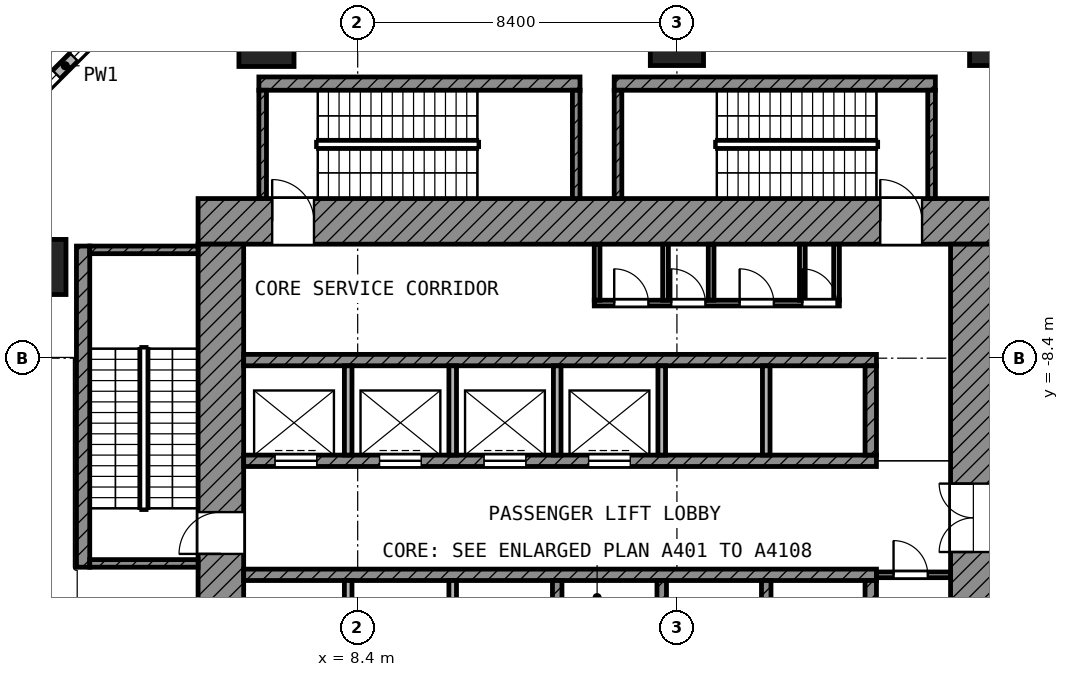
"""IFC4 building model, lengths in metres.
Left out: names, types, materials, properties, quantities, classifications, styles, units other than length and angle.
Written with IfcOpenShell. Run it as: python <this file> out.ifc"""

import sys

from ifc_helpers import new_model, si_unit, direction, frame, frame_2d, origin, origin_2d, place, context, subcontext, project, spatial, rectangle, extrude, element, fill, save


model = new_model("IFC4")
c1 = context("Model", 3, precision=1e-05, world=origin(), true_north=direction((0.0, 1.0)))
c2 = subcontext(c1, "Body", "Model", "MODEL_VIEW")
j1 = project(units=[si_unit("LENGTHUNIT", "METRE"), si_unit("PLANEANGLEUNIT", "RADIAN")], contexts=[c1])
p1 = place(None, origin())
s1 = spatial("IfcSite", under=j1, at=p1, CompositionType="ELEMENT")
p2 = place(p1, origin())
s2 = spatial("IfcBuilding", under=s1, at=p2, CompositionType="ELEMENT")
p3 = place(p2, frame((0.0, 0.0, 18.2)))
s3 = spatial("IfcBuildingStorey", under=s2, at=p3, CompositionType="ELEMENT", Elevation=18.2)
p4 = place(p3, frame((6.0, 0.0, 0.0), z_axis=(0.0, 0.0, 1.0), x_axis=(1.0, 0.0, 0.0)))
e1 = element("IfcColumn", 1, at=p4, inside=s3, PredefinedType="COLUMN", context=c2, shape_type="SweptSolid", body=[
    extrude(rectangle(XDim=1.45, YDim=1.45, at=origin_2d()), origin(), (0.0, 0.0, 1.0), 5.6),
])
for number, where, z_axis, x_axis in (
    (2, (16.8, 0.0, 0.0), (0.0, 0.0, 1.0), (1.0, 0.0, 0.0)),
    (3, (25.2, 0.0, 0.0), (0.0, 0.0, 1.0), (1.0, 0.0, 0.0)),
):
    element("IfcColumn", number, at=place(p3, frame(where, z_axis=z_axis, x_axis=x_axis)), inside=s3, PredefinedType="COLUMN", context=c2, shape_type="SweptSolid", body=[
        extrude(rectangle(XDim=1.4, YDim=1.4, at=origin_2d()), origin(), (0.0, 0.0, 1.0), 5.6),
    ])
p5 = place(p3, frame((0.0, -6.0, 0.0), z_axis=(0.0, 0.0, 1.0), x_axis=(1.0, 0.0, 0.0)))
e4 = element("IfcColumn", 4, at=p5, inside=s3, PredefinedType="COLUMN", context=c2, shape_type="SweptSolid", body=[
    extrude(rectangle(XDim=1.45, YDim=1.45, at=origin_2d()), origin(), (0.0, 0.0, 1.0), 5.6),
])
p6 = place(p3, frame((3.662, 2.25, 0.0), z_axis=(0.0, 0.0, 1.0), x_axis=(-0.707106781187, -0.707106781187, 0.0)))
e5 = element("IfcWall", 5, at=p6, inside=s3, PredefinedType="SOLIDWALL", context=c2, shape_type="SweptSolid", body=[
    extrude(rectangle(XDim=8.361, YDim=0.3, at=frame_2d((4.181, 0.0))), origin(), (0.0, 0.0, 1.0), 5.05),
])
p7 = place(p6, frame((0.259, 0.0, 0.9)))
e6 = element("IfcOpeningElement", 6, at=p7, cuts=e5, PredefinedType="OPENING", context=c2, shape_type="SweptSolid", body=[
    extrude(rectangle(XDim=3.6, YDim=3.0, at=frame_2d((1.8, 1.5))), frame((0.0, 0.16, 0.0), z_axis=(0.0, -1.0, 0.0), x_axis=(1.0, 0.0, 0.0)), (0.0, 0.0, 1.0), 0.32),
])
p8 = place(p6, frame((4.502, 0.0, 0.9)))
e7 = element("IfcOpeningElement", 7, at=p8, cuts=e5, PredefinedType="OPENING", context=c2, shape_type="SweptSolid", body=[
    extrude(rectangle(XDim=3.6, YDim=3.0, at=frame_2d((1.8, 1.5))), frame((0.0, 0.16, 0.0), z_axis=(0.0, -1.0, 0.0), x_axis=(1.0, 0.0, 0.0)), (0.0, 0.0, 1.0), 0.32),
])
p9 = place(p3, frame((4.2, -4.8, 0.0), z_axis=(0.0, 0.0, 1.0), x_axis=(1.0, 0.0, 0.0)))
e8 = element("IfcWall", 8, at=p9, inside=s3, PredefinedType="SHEAR", context=c2, shape_type="SweptSolid", body=[
    extrude(rectangle(XDim=21.0, YDim=1.2, at=frame_2d((10.5, 0.0))), origin(), (0.0, 0.0, 1.0), 5.05),
])
p10 = place(p9, frame((1.95, 0.0, 0.0)))
e9 = element("IfcOpeningElement", 9, at=p10, cuts=e8, PredefinedType="OPENING", context=c2, shape_type="SweptSolid", body=[
    extrude(rectangle(XDim=1.1, YDim=2.1, at=frame_2d((0.55, 1.05))), frame((0.0, 0.61, 0.0), z_axis=(0.0, -1.0, 0.0), x_axis=(1.0, 0.0, 0.0)), (0.0, 0.0, 1.0), 1.22),
])
p11 = place(p9, frame((17.95, 0.0, 0.0)))
e10 = element("IfcOpeningElement", 10, at=p11, cuts=e8, PredefinedType="OPENING", context=c2, shape_type="SweptSolid", body=[
    extrude(rectangle(XDim=1.1, YDim=2.1, at=frame_2d((0.55, 1.05))), frame((0.0, 0.61, 0.0), z_axis=(0.0, -1.0, 0.0), x_axis=(1.0, 0.0, 0.0)), (0.0, 0.0, 1.0), 1.22),
])
p12 = place(p3, frame((4.8, -25.2, 0.0), z_axis=(0.0, 0.0, 1.0), x_axis=(0.0, 1.0, 0.0)))
e11 = element("IfcWall", 11, at=p12, inside=s3, PredefinedType="SHEAR", context=c2, shape_type="SweptSolid", body=[
    extrude(rectangle(XDim=19.8, YDim=1.2, at=frame_2d((9.9, 0.0))), origin(), (0.0, 0.0, 1.0), 5.05),
])
p13 = place(p12, frame((11.65, 0.0, 0.0)))
e12 = element("IfcOpeningElement", 12, at=p13, cuts=e11, PredefinedType="OPENING", context=c2, shape_type="SweptSolid", body=[
    extrude(rectangle(XDim=1.1, YDim=2.1, at=frame_2d((0.55, 1.05))), frame((0.0, 0.61, 0.0), z_axis=(0.0, -1.0, 0.0), x_axis=(1.0, 0.0, 0.0)), (0.0, 0.0, 1.0), 1.22),
])
p14 = place(p12, frame((2.35, 0.0, 0.0)))
e13 = element("IfcOpeningElement", 13, at=p14, cuts=e11, PredefinedType="OPENING", context=c2, shape_type="SweptSolid", body=[
    extrude(rectangle(XDim=1.1, YDim=2.1, at=frame_2d((0.55, 1.05))), frame((0.0, 0.61, 0.0), z_axis=(0.0, -1.0, 0.0), x_axis=(1.0, 0.0, 0.0)), (0.0, 0.0, 1.0), 1.22),
])
p15 = place(p3, frame((24.6, -24.0, 0.0), z_axis=(0.0, 0.0, 1.0), x_axis=(0.0, 1.0, 0.0)))
e14 = element("IfcWall", 14, at=p15, inside=s3, PredefinedType="SHEAR", context=c2, shape_type="SweptSolid", body=[
    extrude(rectangle(XDim=18.6, YDim=1.2, at=frame_2d((9.3, 0.0))), origin(), (0.0, 0.0, 1.0), 5.05),
])
p16 = place(p15, frame((10.5, 0.0, 0.0)))
e15 = element("IfcOpeningElement", 15, at=p16, cuts=e14, PredefinedType="OPENING", context=c2, shape_type="SweptSolid", body=[
    extrude(rectangle(XDim=1.8, YDim=2.1, at=frame_2d((0.9, 1.05))), frame((0.0, 0.61, 0.0), z_axis=(0.0, -1.0, 0.0), x_axis=(1.0, 0.0, 0.0)), (0.0, 0.0, 1.0), 1.22),
])
p17 = place(p3, frame((5.4, -8.45, 0.0), z_axis=(0.0, 0.0, 1.0), x_axis=(1.0, 0.0, 0.0)))
e16 = element("IfcWall", 16, at=p17, inside=s3, PredefinedType="SHEAR", context=c2, shape_type="SweptSolid", body=[
    extrude(rectangle(XDim=16.65, YDim=0.3, at=frame_2d((8.325, 0.0))), origin(), (0.0, 0.0, 1.0), 5.05),
])
p18 = place(p3, frame((5.4, -11.1, 0.0), z_axis=(0.0, 0.0, 1.0), x_axis=(1.0, 0.0, 0.0)))
e17 = element("IfcWall", 17, at=p18, inside=s3, PredefinedType="SHEAR", context=c2, shape_type="SweptSolid", body=[
    extrude(rectangle(XDim=16.65, YDim=0.3, at=frame_2d((8.325, 0.0))), origin(), (0.0, 0.0, 1.0), 5.05),
])
p19 = place(p18, frame((0.825, 0.0, 0.0)))
e18 = element("IfcOpeningElement", 18, at=p19, cuts=e17, PredefinedType="OPENING", context=c2, shape_type="SweptSolid", body=[
    extrude(rectangle(XDim=1.1, YDim=2.1, at=frame_2d((0.55, 1.05))), frame((0.0, 0.16, 0.0), z_axis=(0.0, -1.0, 0.0), x_axis=(1.0, 0.0, 0.0)), (0.0, 0.0, 1.0), 0.32),
])
p20 = place(p18, frame((3.575, 0.0, 0.0)))
e19 = element("IfcOpeningElement", 19, at=p20, cuts=e17, PredefinedType="OPENING", context=c2, shape_type="SweptSolid", body=[
    extrude(rectangle(XDim=1.1, YDim=2.1, at=frame_2d((0.55, 1.05))), frame((0.0, 0.16, 0.0), z_axis=(0.0, -1.0, 0.0), x_axis=(1.0, 0.0, 0.0)), (0.0, 0.0, 1.0), 0.32),
])
p21 = place(p18, frame((6.325, 0.0, 0.0)))
e20 = element("IfcOpeningElement", 20, at=p21, cuts=e17, PredefinedType="OPENING", context=c2, shape_type="SweptSolid", body=[
    extrude(rectangle(XDim=1.1, YDim=2.1, at=frame_2d((0.55, 1.05))), frame((0.0, 0.16, 0.0), z_axis=(0.0, -1.0, 0.0), x_axis=(1.0, 0.0, 0.0)), (0.0, 0.0, 1.0), 0.32),
])
p22 = place(p18, frame((9.075, 0.0, 0.0)))
e21 = element("IfcOpeningElement", 21, at=p22, cuts=e17, PredefinedType="OPENING", context=c2, shape_type="SweptSolid", body=[
    extrude(rectangle(XDim=1.1, YDim=2.1, at=frame_2d((0.55, 1.05))), frame((0.0, 0.16, 0.0), z_axis=(0.0, -1.0, 0.0), x_axis=(1.0, 0.0, 0.0)), (0.0, 0.0, 1.0), 0.32),
])
p23 = place(p3, frame((5.4, -14.1, 0.0), z_axis=(0.0, 0.0, 1.0), x_axis=(1.0, 0.0, 0.0)))
e22 = element("IfcWall", 22, at=p23, inside=s3, PredefinedType="SHEAR", context=c2, shape_type="SweptSolid", body=[
    extrude(rectangle(XDim=16.65, YDim=0.3, at=frame_2d((8.325, 0.0))), origin(), (0.0, 0.0, 1.0), 5.05),
])
p24 = place(p3, frame((21.9, -10.95, 0.0), z_axis=(0.0, 0.0, 1.0), x_axis=(0.0, 1.0, 0.0)))
e23 = element("IfcWall", 23, at=p24, inside=s3, PredefinedType="SHEAR", context=c2, shape_type="SweptSolid", body=[
    extrude(rectangle(XDim=2.35, YDim=0.3, at=frame_2d((1.175, 0.0))), origin(), (0.0, 0.0, 1.0), 5.05),
])
p25 = place(p3, frame((21.9, -16.6, 0.0), z_axis=(0.0, 0.0, 1.0), x_axis=(0.0, 1.0, 0.0)))
e24 = element("IfcWall", 24, at=p25, inside=s3, PredefinedType="SHEAR", context=c2, shape_type="SweptSolid", body=[
    extrude(rectangle(XDim=2.35, YDim=0.3, at=frame_2d((1.175, 0.0))), origin(), (0.0, 0.0, 1.0), 5.05),
])
for number, where, z_axis, x_axis in (
    (25, (8.15, -10.95, 0.0), (0.0, 0.0, 1.0), (0.0, 1.0, 0.0)),
    (26, (10.9, -10.95, 0.0), (0.0, 0.0, 1.0), (0.0, 1.0, 0.0)),
    (27, (13.65, -10.95, 0.0), (0.0, 0.0, 1.0), (0.0, 1.0, 0.0)),
    (28, (16.4, -10.95, 0.0), (0.0, 0.0, 1.0), (0.0, 1.0, 0.0)),
    (29, (19.15, -10.95, 0.0), (0.0, 0.0, 1.0), (0.0, 1.0, 0.0)),
):
    element("IfcWall", number, at=place(p3, frame(where, z_axis=z_axis, x_axis=x_axis)), inside=s3, PredefinedType="PARTITIONING", context=c2, shape_type="SweptSolid", body=[
        extrude(rectangle(XDim=2.35, YDim=0.2, at=frame_2d((1.175, 0.0))), origin(), (0.0, 0.0, 1.0), 5.05),
    ])
for number, where, z_axis, x_axis in (
    (30, (8.15, -16.6, 0.0), (0.0, 0.0, 1.0), (0.0, 1.0, 0.0)),
    (31, (10.9, -16.6, 0.0), (0.0, 0.0, 1.0), (0.0, 1.0, 0.0)),
):
    element("IfcWall", number, at=place(p3, frame(where, z_axis=z_axis, x_axis=x_axis)), inside=s3, PredefinedType="PARTITIONING", context=c2, shape_type="SweptSolid", body=[
        extrude(rectangle(XDim=2.35, YDim=0.2, at=frame_2d((1.175, 0.0))), origin(), (0.0, 0.0, 1.0), 5.05),
    ])
for number, where, z_axis, x_axis in (
    (32, (13.65, -16.6, 0.0), (0.0, 0.0, 1.0), (0.0, 1.0, 0.0)),
    (33, (16.4, -16.6, 0.0), (0.0, 0.0, 1.0), (0.0, 1.0, 0.0)),
    (34, (19.15, -16.6, 0.0), (0.0, 0.0, 1.0), (0.0, 1.0, 0.0)),
):
    element("IfcWall", number, at=place(p3, frame(where, z_axis=z_axis, x_axis=x_axis)), inside=s3, PredefinedType="SHEAR", context=c2, shape_type="SweptSolid", body=[
        extrude(rectangle(XDim=2.35, YDim=0.25, at=frame_2d((1.175, 0.0))), origin(), (0.0, 0.0, 1.0), 5.05),
    ])
p26 = place(p3, frame((22.05, -14.1, 0.0), z_axis=(0.0, 0.0, 1.0), x_axis=(1.0, 0.0, 0.0)))
e35 = element("IfcWall", 35, at=p26, inside=s3, PredefinedType="PARTITIONING", context=c2, shape_type="SweptSolid", body=[
    extrude(rectangle(XDim=1.95, YDim=0.15, at=frame_2d((0.975, 0.0))), origin(), (0.0, 0.0, 1.0), 5.05),
])
p27 = place(p26, frame((0.45, 0.0, 0.0)))
e36 = element("IfcOpeningElement", 36, at=p27, cuts=e35, PredefinedType="OPENING", context=c2, shape_type="SweptSolid", body=[
    extrude(rectangle(XDim=0.9, YDim=2.1, at=frame_2d((0.45, 1.05))), frame((0.0, 0.085, 0.0), z_axis=(0.0, -1.0, 0.0), x_axis=(1.0, 0.0, 0.0)), (0.0, 0.0, 1.0), 0.17),
])
p28 = place(p3, frame((14.625, -6.95, 0.0), z_axis=(0.0, 0.0, 1.0), x_axis=(1.0, 0.0, 0.0)))
e37 = element("IfcWall", 37, at=p28, inside=s3, PredefinedType="PARTITIONING", context=c2, shape_type="SweptSolid", body=[
    extrude(rectangle(XDim=6.45, YDim=0.15, at=frame_2d((3.225, 0.0))), origin(), (0.0, 0.0, 1.0), 5.05),
])
p29 = place(p28, frame((0.525, 0.0, 0.0)))
e38 = element("IfcOpeningElement", 38, at=p29, cuts=e37, PredefinedType="OPENING", context=c2, shape_type="SweptSolid", body=[
    extrude(rectangle(XDim=0.9, YDim=2.1, at=frame_2d((0.45, 1.05))), frame((0.0, 0.085, 0.0), z_axis=(0.0, -1.0, 0.0), x_axis=(1.0, 0.0, 0.0)), (0.0, 0.0, 1.0), 0.17),
])
p30 = place(p28, frame((2.025, 0.0, 0.0)))
e39 = element("IfcOpeningElement", 39, at=p30, cuts=e37, PredefinedType="OPENING", context=c2, shape_type="SweptSolid", body=[
    extrude(rectangle(XDim=0.9, YDim=2.1, at=frame_2d((0.45, 1.05))), frame((0.0, 0.085, 0.0), z_axis=(0.0, -1.0, 0.0), x_axis=(1.0, 0.0, 0.0)), (0.0, 0.0, 1.0), 0.17),
])
p31 = place(p28, frame((3.825, 0.0, 0.0)))
e40 = element("IfcOpeningElement", 40, at=p31, cuts=e37, PredefinedType="OPENING", context=c2, shape_type="SweptSolid", body=[
    extrude(rectangle(XDim=0.9, YDim=2.1, at=frame_2d((0.45, 1.05))), frame((0.0, 0.085, 0.0), z_axis=(0.0, -1.0, 0.0), x_axis=(1.0, 0.0, 0.0)), (0.0, 0.0, 1.0), 0.17),
])
p32 = place(p28, frame((5.475, 0.0, 0.0)))
e41 = element("IfcOpeningElement", 41, at=p32, cuts=e37, PredefinedType="OPENING", context=c2, shape_type="SweptSolid", body=[
    extrude(rectangle(XDim=0.9, YDim=2.1, at=frame_2d((0.45, 1.05))), frame((0.0, 0.085, 0.0), z_axis=(0.0, -1.0, 0.0), x_axis=(1.0, 0.0, 0.0)), (0.0, 0.0, 1.0), 0.17),
])
for number, where, z_axis, x_axis in (
    (42, (14.7, -6.875, 0.0), (0.0, 0.0, 1.0), (0.0, 1.0, 0.0)),
    (43, (16.5, -6.875, 0.0), (0.0, 0.0, 1.0), (0.0, 1.0, 0.0)),
    (44, (17.7, -6.875, 0.0), (0.0, 0.0, 1.0), (0.0, 1.0, 0.0)),
    (45, (20.1, -6.875, 0.0), (0.0, 0.0, 1.0), (0.0, 1.0, 0.0)),
    (46, (21.0, -6.875, 0.0), (0.0, 0.0, 1.0), (0.0, 1.0, 0.0)),
):
    element("IfcWall", number, at=place(p3, frame(where, z_axis=z_axis, x_axis=x_axis)), inside=s3, PredefinedType="PARTITIONING", context=c2, shape_type="SweptSolid", body=[
        extrude(rectangle(XDim=1.475, YDim=0.15, at=frame_2d((0.738, 0.0))), origin(), (0.0, 0.0, 1.0), 5.05),
    ])
p33 = place(p3, frame((1.175, -13.9, 0.0), z_axis=(0.0, 0.0, 1.0), x_axis=(0.0, 1.0, 0.0)))
e47 = element("IfcWall", 47, at=p33, inside=s3, PredefinedType="SHEAR", context=c2, shape_type="SweptSolid", body=[
    extrude(rectangle(XDim=8.45, YDim=0.35, at=frame_2d((4.225, 0.0))), origin(), (0.0, 0.0, 1.0), 5.05),
])
for number, where, z_axis, x_axis in (
    (48, (1.35, -5.55, 0.0), (0.0, 0.0, 1.0), (1.0, 0.0, 0.0)),
    (49, (1.35, -13.8, 0.0), (0.0, 0.0, 1.0), (1.0, 0.0, 0.0)),
):
    element("IfcWall", number, at=place(p3, frame(where, z_axis=z_axis, x_axis=x_axis)), inside=s3, PredefinedType="SHEAR", context=c2, shape_type="SweptSolid", body=[
        extrude(rectangle(XDim=2.85, YDim=0.2, at=frame_2d((1.425, 0.0))), origin(), (0.0, 0.0, 1.0), 5.05),
    ])
p34 = place(p3, frame((5.8, -1.175, 0.0), z_axis=(0.0, 0.0, 1.0), x_axis=(1.0, 0.0, 0.0)))
e50 = element("IfcWall", 50, at=p34, inside=s3, PredefinedType="SHEAR", context=c2, shape_type="SweptSolid", body=[
    extrude(rectangle(XDim=8.45, YDim=0.35, at=frame_2d((4.225, 0.0))), origin(), (0.0, 0.0, 1.0), 5.05),
])
for number, where, z_axis, x_axis in (
    (51, (5.9, -4.2, 0.0), (0.0, 0.0, 1.0), (0.0, 1.0, 0.0)),
    (52, (14.15, -4.2, 0.0), (0.0, 0.0, 1.0), (0.0, 1.0, 0.0)),
):
    element("IfcWall", number, at=place(p3, frame(where, z_axis=z_axis, x_axis=x_axis)), inside=s3, PredefinedType="SHEAR", context=c2, shape_type="SweptSolid", body=[
        extrude(rectangle(XDim=2.85, YDim=0.2, at=frame_2d((1.425, 0.0))), origin(), (0.0, 0.0, 1.0), 5.05),
    ])
p35 = place(p3, frame((15.15, -1.175, 0.0), z_axis=(0.0, 0.0, 1.0), x_axis=(1.0, 0.0, 0.0)))
e53 = element("IfcWall", 53, at=p35, inside=s3, PredefinedType="SHEAR", context=c2, shape_type="SweptSolid", body=[
    extrude(rectangle(XDim=8.45, YDim=0.35, at=frame_2d((4.225, 0.0))), origin(), (0.0, 0.0, 1.0), 5.05),
])
for number, where, z_axis, x_axis in (
    (54, (15.25, -4.2, 0.0), (0.0, 0.0, 1.0), (0.0, 1.0, 0.0)),
    (55, (23.5, -4.2, 0.0), (0.0, 0.0, 1.0), (0.0, 1.0, 0.0)),
):
    element("IfcWall", number, at=place(p3, frame(where, z_axis=z_axis, x_axis=x_axis)), inside=s3, PredefinedType="SHEAR", context=c2, shape_type="SweptSolid", body=[
        extrude(rectangle(XDim=2.85, YDim=0.2, at=frame_2d((1.425, 0.0))), origin(), (0.0, 0.0, 1.0), 5.05),
    ])
p36 = place(p7, origin())
e56 = element("IfcWindow", 56, at=p36, inside=s3, PartitioningType="SINGLE_PANEL", PredefinedType="WINDOW", context=c2, shape_type="SweptSolid", body=[
    extrude(rectangle(XDim=3.6, YDim=3.0, at=frame_2d((1.8, 1.5))), frame((0.0, 0.03, 0.0), z_axis=(0.0, -1.0, 0.0), x_axis=(1.0, 0.0, 0.0)), (0.0, 0.0, 1.0), 0.06),
])
fill(e6, e56)
p37 = place(p8, origin())
e57 = element("IfcWindow", 57, at=p37, inside=s3, PartitioningType="SINGLE_PANEL", PredefinedType="WINDOW", context=c2, shape_type="SweptSolid", body=[
    extrude(rectangle(XDim=3.6, YDim=3.0, at=frame_2d((1.8, 1.5))), frame((0.0, 0.03, 0.0), z_axis=(0.0, -1.0, 0.0), x_axis=(1.0, 0.0, 0.0)), (0.0, 0.0, 1.0), 0.06),
])
fill(e7, e57)
p38 = place(p19, origin())
e58 = element("IfcDoor", 58, at=p38, inside=s3, OperationType="DOUBLE_DOOR_SLIDING", PredefinedType="DOOR", context=c2, shape_type="SweptSolid", body=[
    extrude(rectangle(XDim=1.1, YDim=2.1, at=frame_2d((0.55, 1.05))), frame((0.0, 0.025, 0.0), z_axis=(0.0, -1.0, 0.0), x_axis=(1.0, 0.0, 0.0)), (0.0, 0.0, 1.0), 0.05),
])
fill(e18, e58)
p39 = place(p20, origin())
e59 = element("IfcDoor", 59, at=p39, inside=s3, OperationType="DOUBLE_DOOR_SLIDING", PredefinedType="DOOR", context=c2, shape_type="SweptSolid", body=[
    extrude(rectangle(XDim=1.1, YDim=2.1, at=frame_2d((0.55, 1.05))), frame((0.0, 0.025, 0.0), z_axis=(0.0, -1.0, 0.0), x_axis=(1.0, 0.0, 0.0)), (0.0, 0.0, 1.0), 0.05),
])
fill(e19, e59)
p40 = place(p21, origin())
e60 = element("IfcDoor", 60, at=p40, inside=s3, OperationType="DOUBLE_DOOR_SLIDING", PredefinedType="DOOR", context=c2, shape_type="SweptSolid", body=[
    extrude(rectangle(XDim=1.1, YDim=2.1, at=frame_2d((0.55, 1.05))), frame((0.0, 0.025, 0.0), z_axis=(0.0, -1.0, 0.0), x_axis=(1.0, 0.0, 0.0)), (0.0, 0.0, 1.0), 0.05),
])
fill(e20, e60)
p41 = place(p22, origin())
e61 = element("IfcDoor", 61, at=p41, inside=s3, OperationType="DOUBLE_DOOR_SLIDING", PredefinedType="DOOR", context=c2, shape_type="SweptSolid", body=[
    extrude(rectangle(XDim=1.1, YDim=2.1, at=frame_2d((0.55, 1.05))), frame((0.0, 0.025, 0.0), z_axis=(0.0, -1.0, 0.0), x_axis=(1.0, 0.0, 0.0)), (0.0, 0.0, 1.0), 0.05),
])
fill(e21, e61)
p42 = place(p13, origin())
e62 = element("IfcDoor", 62, at=p42, inside=s3, OperationType="SINGLE_SWING_LEFT", PredefinedType="DOOR", context=c2, shape_type="SweptSolid", body=[
    extrude(rectangle(XDim=1.1, YDim=2.1, at=frame_2d((0.55, 1.05))), frame((0.0, 0.025, 0.0), z_axis=(0.0, -1.0, 0.0), x_axis=(1.0, 0.0, 0.0)), (0.0, 0.0, 1.0), 0.05),
])
fill(e12, e62)
p43 = place(p10, origin())
e63 = element("IfcDoor", 63, at=p43, inside=s3, OperationType="SINGLE_SWING_LEFT", PredefinedType="DOOR", context=c2, shape_type="SweptSolid", body=[
    extrude(rectangle(XDim=1.1, YDim=2.1, at=frame_2d((0.55, 1.05))), frame((0.0, 0.025, 0.0), z_axis=(0.0, -1.0, 0.0), x_axis=(1.0, 0.0, 0.0)), (0.0, 0.0, 1.0), 0.05),
])
fill(e9, e63)
p44 = place(p11, origin())
e64 = element("IfcDoor", 64, at=p44, inside=s3, OperationType="SINGLE_SWING_LEFT", PredefinedType="DOOR", context=c2, shape_type="SweptSolid", body=[
    extrude(rectangle(XDim=1.1, YDim=2.1, at=frame_2d((0.55, 1.05))), frame((0.0, 0.025, 0.0), z_axis=(0.0, -1.0, 0.0), x_axis=(1.0, 0.0, 0.0)), (0.0, 0.0, 1.0), 0.05),
])
fill(e10, e64)
p45 = place(p16, origin())
e65 = element("IfcDoor", 65, at=p45, inside=s3, OperationType="DOUBLE_DOOR_SINGLE_SWING", PredefinedType="DOOR", context=c2, shape_type="SweptSolid", body=[
    extrude(rectangle(XDim=1.8, YDim=2.1, at=frame_2d((0.9, 1.05))), frame((0.0, 0.025, 0.0), z_axis=(0.0, -1.0, 0.0), x_axis=(1.0, 0.0, 0.0)), (0.0, 0.0, 1.0), 0.05),
])
fill(e15, e65)
p46 = place(p29, origin())
e66 = element("IfcDoor", 66, at=p46, inside=s3, OperationType="SINGLE_SWING_LEFT", PredefinedType="DOOR", context=c2, shape_type="SweptSolid", body=[
    extrude(rectangle(XDim=0.9, YDim=2.1, at=frame_2d((0.45, 1.05))), frame((0.0, 0.025, 0.0), z_axis=(0.0, -1.0, 0.0), x_axis=(1.0, 0.0, 0.0)), (0.0, 0.0, 1.0), 0.05),
])
fill(e38, e66)
p47 = place(p30, origin())
e67 = element("IfcDoor", 67, at=p47, inside=s3, OperationType="SINGLE_SWING_LEFT", PredefinedType="DOOR", context=c2, shape_type="SweptSolid", body=[
    extrude(rectangle(XDim=0.9, YDim=2.1, at=frame_2d((0.45, 1.05))), frame((0.0, 0.025, 0.0), z_axis=(0.0, -1.0, 0.0), x_axis=(1.0, 0.0, 0.0)), (0.0, 0.0, 1.0), 0.05),
])
fill(e39, e67)
p48 = place(p31, origin())
e68 = element("IfcDoor", 68, at=p48, inside=s3, OperationType="SINGLE_SWING_LEFT", PredefinedType="DOOR", context=c2, shape_type="SweptSolid", body=[
    extrude(rectangle(XDim=0.9, YDim=2.1, at=frame_2d((0.45, 1.05))), frame((0.0, 0.025, 0.0), z_axis=(0.0, -1.0, 0.0), x_axis=(1.0, 0.0, 0.0)), (0.0, 0.0, 1.0), 0.05),
])
fill(e40, e68)
p49 = place(p32, origin())
e69 = element("IfcDoor", 69, at=p49, inside=s3, OperationType="SINGLE_SWING_LEFT", PredefinedType="DOOR", context=c2, shape_type="SweptSolid", body=[
    extrude(rectangle(XDim=0.9, YDim=2.1, at=frame_2d((0.45, 1.05))), frame((0.0, 0.025, 0.0), z_axis=(0.0, -1.0, 0.0), x_axis=(1.0, 0.0, 0.0)), (0.0, 0.0, 1.0), 0.05),
])
fill(e41, e69)
p50 = place(p27, origin())
e70 = element("IfcDoor", 70, at=p50, inside=s3, OperationType="SINGLE_SWING_LEFT", PredefinedType="DOOR", context=c2, shape_type="SweptSolid", body=[
    extrude(rectangle(XDim=0.9, YDim=2.1, at=frame_2d((0.45, 1.05))), frame((0.0, 0.025, 0.0), z_axis=(0.0, -1.0, 0.0), x_axis=(1.0, 0.0, 0.0)), (0.0, 0.0, 1.0), 0.05),
])
fill(e36, e70)
save(model, sys.argv[1])
